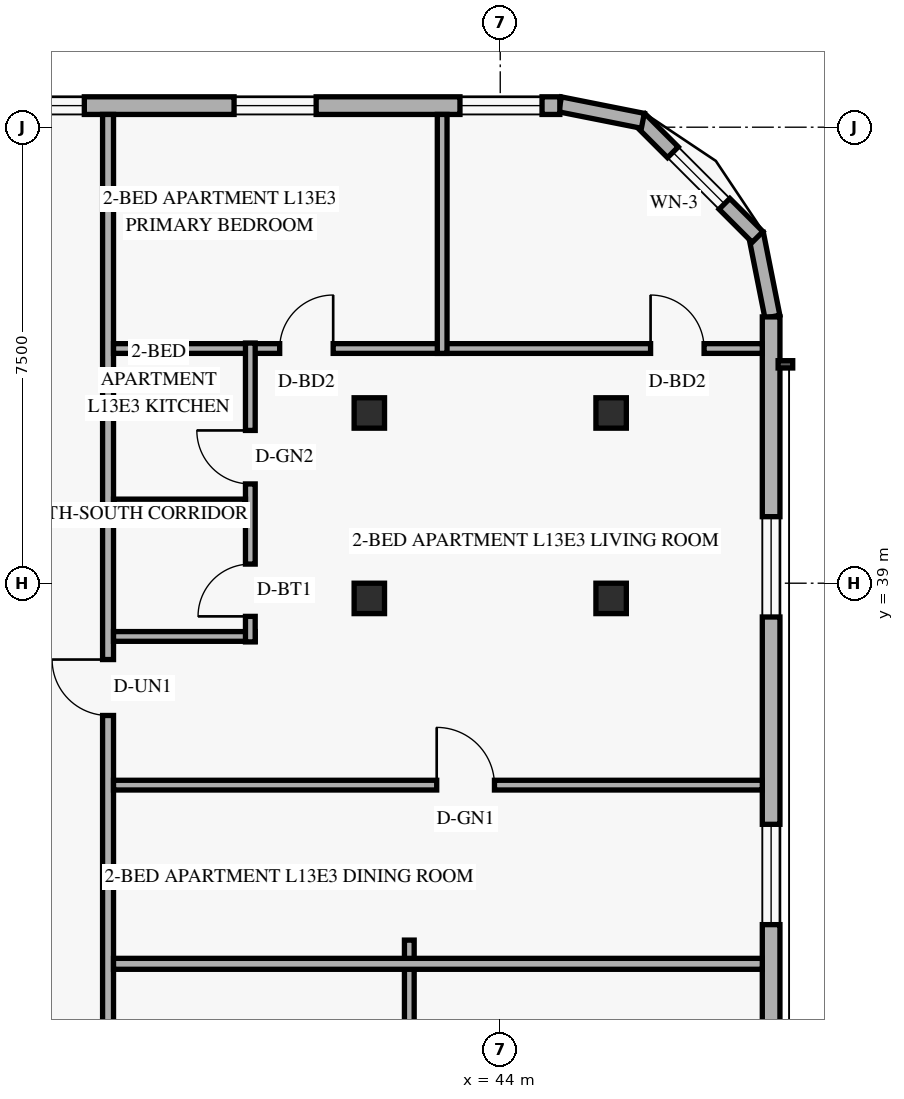
"""IFC4 building model, lengths in metres.
Left out: names, types, materials, properties, quantities, classifications, styles, units other than length and angle.
Written with IfcOpenShell. Run it as: python <this file> out.ifc"""

import sys

from ifc_helpers import new_model, si_unit, direction, frame, frame_2d, origin, origin_2d, place, context, subcontext, project, spatial, rectangle, hollow_rectangle, extrude, element, fill, save


model = new_model("IFC4")
c1 = context("Model", 3, precision=1e-05, world=origin(), true_north=direction((0.0, 1.0)))
c2 = subcontext(c1, "Body", "Model", "MODEL_VIEW")
j1 = project(units=[si_unit("LENGTHUNIT", "METRE"), si_unit("PLANEANGLEUNIT", "RADIAN")], contexts=[c1])
p1 = place(None, origin())
s1 = spatial("IfcSite", under=j1, at=p1, CompositionType="ELEMENT")
p2 = place(p1, origin())
s2 = spatial("IfcBuilding", under=s1, at=p2, CompositionType="ELEMENT")
p3 = place(p2, frame((0.0, 0.0, 52.8)))
s3 = spatial("IfcBuildingStorey", under=s2, at=p3, CompositionType="ELEMENT", Elevation=52.8)
for number, where, z_axis, x_axis in (
    (1, (41.784, 38.75, 0.0), (0.035, 0.0, 0.999), (0.0, 1.0, 0.0)),
    (2, (41.784, 41.8, 0.0), (0.035, 0.0, 0.999), (0.0, 1.0, 0.0)),
):
    element("IfcColumn", number, at=place(p3, frame(where, z_axis=z_axis, x_axis=x_axis)), inside=s3, PredefinedType="COLUMN", context=c2, shape_type="SweptSolid", body=[
        extrude(hollow_rectangle(XDim=0.5, YDim=0.5, WallThickness=0.022, at=origin_2d()), origin(), (0.0, 0.0, 1.0), 3.602),
    ])
for number, where, z_axis, x_axis in (
    (3, (45.719, 38.75, 0.0), (0.058, 0.0, 0.998), (0.0, 1.0, 0.0)),
    (4, (45.719, 41.8, 0.0), (0.058, 0.0, 0.998), (0.0, 1.0, 0.0)),
):
    element("IfcColumn", number, at=place(p3, frame(where, z_axis=z_axis, x_axis=x_axis)), inside=s3, PredefinedType="COLUMN", context=c2, shape_type="SweptSolid", body=[
        extrude(hollow_rectangle(XDim=0.5, YDim=0.5, WallThickness=0.022, at=origin_2d()), origin(), (0.0, 0.0, 1.0), 3.606),
    ])
p4 = place(p3, frame((48.476, 43.384, 0.0), z_axis=(0.0, 0.0, 1.0), x_axis=(-0.19496651342, 0.980809899341, 0.0)))
e5 = element("IfcWall", 5, at=p4, inside=s3, PredefinedType="SOLIDWALL", context=c2, shape_type="SweptSolid", body=[
    extrude(rectangle(XDim=1.389, YDim=0.25, at=frame_2d((0.694, 0.0))), origin(), (0.0, 0.0, 1.0), 3.36),
])
p5 = place(p3, frame((48.232, 44.695, 0.0), z_axis=(0.0, 0.0, 1.0), x_axis=(-0.707106781187, 0.707106781187, 0.0)))
e6 = element("IfcWall", 6, at=p5, inside=s3, PredefinedType="SOLIDWALL", context=c2, shape_type="SweptSolid", body=[
    extrude(rectangle(XDim=2.739, YDim=0.25, at=frame_2d((1.37, 0.0))), origin(), (0.0, 0.0, 1.0), 3.36),
])
p6 = place(p5, frame((0.77, 0.0, 0.85)))
e7 = element("IfcOpeningElement", 7, at=p6, cuts=e6, PredefinedType="OPENING", context=c2, shape_type="SweptSolid", body=[
    extrude(rectangle(XDim=1.2, YDim=1.5, at=frame_2d((0.6, 0.75))), frame((0.0, 0.135, 0.0), z_axis=(0.0, -1.0, 0.0), x_axis=(1.0, 0.0, 0.0)), (0.0, 0.0, 1.0), 0.27),
])
p7 = place(p3, frame((46.345, 46.605, 0.0), z_axis=(0.0, 0.0, 1.0), x_axis=(-0.980809899341, 0.19496651342, 0.0)))
e8 = element("IfcWall", 8, at=p7, inside=s3, PredefinedType="SOLIDWALL", context=c2, shape_type="SweptSolid", body=[
    extrude(rectangle(XDim=1.389, YDim=0.25, at=frame_2d((0.694, 0.0))), origin(), (0.0, 0.0, 1.0), 3.36),
])
p8 = place(p3, frame((48.455, 4.62, 0.0), z_axis=(0.0, 0.0, 1.0), x_axis=(0.0, 1.0, 0.0)))
e9 = element("IfcWall", 9, at=p8, inside=s3, PredefinedType="SOLIDWALL", context=c2, shape_type="SweptSolid", body=[
    extrude(rectangle(XDim=38.76, YDim=0.29, at=frame_2d((19.38, 0.0))), origin(), (0.0, 0.0, 1.0), 3.36),
])
p9 = place(p8, frame((5.415, 0.0, 0.85)))
e10 = element("IfcOpeningElement", 10, at=p9, cuts=e9, PredefinedType="OPENING", context=c2, shape_type="SweptSolid", body=[
    extrude(rectangle(XDim=1.65, YDim=1.6, at=frame_2d((0.825, 0.8))), frame((0.0, 0.155, 0.0), z_axis=(0.0, -1.0, 0.0), x_axis=(1.0, 0.0, 0.0)), (0.0, 0.0, 1.0), 0.31),
])
p10 = place(p8, frame((13.559, 0.0, 0.85)))
e11 = element("IfcOpeningElement", 11, at=p10, cuts=e9, PredefinedType="OPENING", context=c2, shape_type="SweptSolid", body=[
    extrude(rectangle(XDim=1.65, YDim=1.6, at=frame_2d((0.825, 0.8))), frame((0.0, 0.155, 0.0), z_axis=(0.0, -1.0, 0.0), x_axis=(1.0, 0.0, 0.0)), (0.0, 0.0, 1.0), 0.31),
])
p11 = place(p8, frame((19.134, 0.0, 0.85)))
e12 = element("IfcOpeningElement", 12, at=p11, cuts=e9, PredefinedType="OPENING", context=c2, shape_type="SweptSolid", body=[
    extrude(rectangle(XDim=1.65, YDim=1.6, at=frame_2d((0.825, 0.8))), frame((0.0, 0.155, 0.0), z_axis=(0.0, -1.0, 0.0), x_axis=(1.0, 0.0, 0.0)), (0.0, 0.0, 1.0), 0.31),
])
p12 = place(p8, frame((25.05, 0.0, 0.85)))
e13 = element("IfcOpeningElement", 13, at=p12, cuts=e9, PredefinedType="OPENING", context=c2, shape_type="SweptSolid", body=[
    extrude(rectangle(XDim=1.65, YDim=1.6, at=frame_2d((0.825, 0.8))), frame((0.0, 0.155, 0.0), z_axis=(0.0, -1.0, 0.0), x_axis=(1.0, 0.0, 0.0)), (0.0, 0.0, 1.0), 0.31),
])
p13 = place(p8, frame((28.764, 0.0, 0.85)))
e14 = element("IfcOpeningElement", 14, at=p13, cuts=e9, PredefinedType="OPENING", context=c2, shape_type="SweptSolid", body=[
    extrude(rectangle(XDim=1.65, YDim=1.6, at=frame_2d((0.825, 0.8))), frame((0.0, 0.155, 0.0), z_axis=(0.0, -1.0, 0.0), x_axis=(1.0, 0.0, 0.0)), (0.0, 0.0, 1.0), 0.31),
])
p14 = place(p8, frame((33.824, 0.0, 0.85)))
e15 = element("IfcOpeningElement", 15, at=p14, cuts=e9, PredefinedType="OPENING", context=c2, shape_type="SweptSolid", body=[
    extrude(rectangle(XDim=1.65, YDim=1.6, at=frame_2d((0.825, 0.8))), frame((0.0, 0.155, 0.0), z_axis=(0.0, -1.0, 0.0), x_axis=(1.0, 0.0, 0.0)), (0.0, 0.0, 1.0), 0.31),
])
p15 = place(p3, frame((44.98, 46.855, 0.0), z_axis=(0.0, 0.0, 1.0), x_axis=(-1.0, 0.0, 0.0)))
e16 = element("IfcWall", 16, at=p15, inside=s3, PredefinedType="SOLIDWALL", context=c2, shape_type="SweptSolid", body=[
    extrude(rectangle(XDim=39.56, YDim=0.29, at=frame_2d((19.78, 0.0))), origin(), (0.0, 0.0, 1.0), 3.36),
])
p16 = place(p15, frame((35.445, 0.0, 0.85)))
e17 = element("IfcOpeningElement", 17, at=p16, cuts=e16, PredefinedType="OPENING", context=c2, shape_type="SweptSolid", body=[
    extrude(rectangle(XDim=1.35, YDim=1.55, at=frame_2d((0.675, 0.775))), frame((0.0, 0.155, 0.0), z_axis=(0.0, -1.0, 0.0), x_axis=(1.0, 0.0, 0.0)), (0.0, 0.0, 1.0), 0.31),
])
p17 = place(p15, frame((31.18, 0.0, 0.85)))
e18 = element("IfcOpeningElement", 18, at=p17, cuts=e16, PredefinedType="OPENING", context=c2, shape_type="SweptSolid", body=[
    extrude(rectangle(XDim=1.2, YDim=1.5, at=frame_2d((0.6, 0.75))), frame((0.0, 0.155, 0.0), z_axis=(0.0, -1.0, 0.0), x_axis=(1.0, 0.0, 0.0)), (0.0, 0.0, 1.0), 0.31),
])
p18 = place(p15, frame((25.088, 0.0, 0.85)))
e19 = element("IfcOpeningElement", 19, at=p18, cuts=e16, PredefinedType="OPENING", context=c2, shape_type="SweptSolid", body=[
    extrude(rectangle(XDim=1.35, YDim=1.55, at=frame_2d((0.675, 0.775))), frame((0.0, 0.155, 0.0), z_axis=(0.0, -1.0, 0.0), x_axis=(1.0, 0.0, 0.0)), (0.0, 0.0, 1.0), 0.31),
])
p19 = place(p15, frame((16.498, 0.0, 0.85)))
e20 = element("IfcOpeningElement", 20, at=p19, cuts=e16, PredefinedType="OPENING", context=c2, shape_type="SweptSolid", body=[
    extrude(rectangle(XDim=1.35, YDim=1.55, at=frame_2d((0.675, 0.775))), frame((0.0, 0.155, 0.0), z_axis=(0.0, -1.0, 0.0), x_axis=(1.0, 0.0, 0.0)), (0.0, 0.0, 1.0), 0.31),
])
p20 = place(p15, frame((10.955, 0.0, 0.85)))
e21 = element("IfcOpeningElement", 21, at=p20, cuts=e16, PredefinedType="OPENING", context=c2, shape_type="SweptSolid", body=[
    extrude(rectangle(XDim=1.35, YDim=1.55, at=frame_2d((0.675, 0.775))), frame((0.0, 0.155, 0.0), z_axis=(0.0, -1.0, 0.0), x_axis=(1.0, 0.0, 0.0)), (0.0, 0.0, 1.0), 0.31),
])
p21 = place(p15, frame((7.82, 0.0, 0.85)))
e22 = element("IfcOpeningElement", 22, at=p21, cuts=e16, PredefinedType="OPENING", context=c2, shape_type="SweptSolid", body=[
    extrude(rectangle(XDim=1.35, YDim=1.55, at=frame_2d((0.675, 0.775))), frame((0.0, 0.155, 0.0), z_axis=(0.0, -1.0, 0.0), x_axis=(1.0, 0.0, 0.0)), (0.0, 0.0, 1.0), 0.31),
])
p22 = place(p15, frame((4.008, 0.0, 0.85)))
e23 = element("IfcOpeningElement", 23, at=p22, cuts=e16, PredefinedType="OPENING", context=c2, shape_type="SweptSolid", body=[
    extrude(rectangle(XDim=1.35, YDim=1.55, at=frame_2d((0.675, 0.775))), frame((0.0, 0.155, 0.0), z_axis=(0.0, -1.0, 0.0), x_axis=(1.0, 0.0, 0.0)), (0.0, 0.0, 1.0), 0.31),
])
p23 = place(p15, frame((0.292, 0.0, 0.85)))
e24 = element("IfcOpeningElement", 24, at=p23, cuts=e16, PredefinedType="OPENING", context=c2, shape_type="SweptSolid", body=[
    extrude(rectangle(XDim=1.35, YDim=1.55, at=frame_2d((0.675, 0.775))), frame((0.0, 0.155, 0.0), z_axis=(0.0, -1.0, 0.0), x_axis=(1.0, 0.0, 0.0)), (0.0, 0.0, 1.0), 0.31),
])
p24 = place(p3, frame((37.55, 1.29, 0.0), z_axis=(0.0, 0.0, 1.0), x_axis=(0.0, 1.0, 0.0)))
e25 = element("IfcWall", 25, at=p24, inside=s3, PredefinedType="STANDARD", context=c2, shape_type="SweptSolid", body=[
    extrude(rectangle(XDim=45.42, YDim=0.18, at=frame_2d((22.71, 0.0))), origin(), (0.0, 0.0, 1.0), 2.649),
])
p25 = place(p24, frame((9.87, 0.0, 0.0)))
e26 = element("IfcOpeningElement", 26, at=p25, cuts=e25, PredefinedType="OPENING", context=c2, shape_type="SweptSolid", body=[
    extrude(rectangle(XDim=0.92, YDim=2.15, at=frame_2d((0.46, 1.075))), frame((0.0, 0.1, 0.0), z_axis=(0.0, -1.0, 0.0), x_axis=(1.0, 0.0, 0.0)), (0.0, 0.0, 1.0), 0.2),
])
p26 = place(p24, frame((20.953, 0.0, 0.0)))
e27 = element("IfcOpeningElement", 27, at=p26, cuts=e25, PredefinedType="OPENING", context=c2, shape_type="SweptSolid", body=[
    extrude(rectangle(XDim=0.92, YDim=2.15, at=frame_2d((0.46, 1.075))), frame((0.0, 0.1, 0.0), z_axis=(0.0, -1.0, 0.0), x_axis=(1.0, 0.0, 0.0)), (0.0, 0.0, 1.0), 0.2),
])
p27 = place(p24, frame((35.534, 0.0, 0.0)))
e28 = element("IfcOpeningElement", 28, at=p27, cuts=e25, PredefinedType="OPENING", context=c2, shape_type="SweptSolid", body=[
    extrude(rectangle(XDim=0.92, YDim=2.15, at=frame_2d((0.46, 1.075))), frame((0.0, 0.1, 0.0), z_axis=(0.0, -1.0, 0.0), x_axis=(1.0, 0.0, 0.0)), (0.0, 0.0, 1.0), 0.2),
])
p28 = place(p3, frame((42.504, 28.17, 0.0), z_axis=(0.0, 0.0, 1.0), x_axis=(0.0, 1.0, 0.0)))
e29 = element("IfcWall", 29, at=p28, inside=s3, PredefinedType="PARTITIONING", context=c2, shape_type="SweptSolid", body=[
    extrude(rectangle(XDim=4.96, YDim=0.16, at=frame_2d((2.48, 0.0))), origin(), (0.0, 0.0, 1.0), 2.649),
])
p29 = place(p3, frame((37.64, 32.74, 0.0), z_axis=(0.0, 0.0, 1.0), x_axis=(1.0, 0.0, 0.0)))
e30 = element("IfcWall", 30, at=p29, inside=s3, PredefinedType="PARTITIONING", context=c2, shape_type="SweptSolid", body=[
    extrude(rectangle(XDim=10.67, YDim=0.18, at=frame_2d((5.335, 0.0))), origin(), (0.0, 0.0, 1.0), 2.649),
])
p30 = place(p3, frame((37.64, 42.86, 0.0), z_axis=(0.0, 0.0, 1.0), x_axis=(1.0, 0.0, 0.0)))
e31 = element("IfcWall", 31, at=p30, inside=s3, PredefinedType="PARTITIONING", context=c2, shape_type="SweptSolid", body=[
    extrude(rectangle(XDim=10.67, YDim=0.16, at=frame_2d((5.335, 0.0))), origin(), (0.0, 0.0, 1.0), 3.36),
])
p31 = place(p30, frame((2.732, 0.0, 0.0)))
e32 = element("IfcOpeningElement", 32, at=p31, cuts=e31, PredefinedType="OPENING", context=c2, shape_type="SweptSolid", body=[
    extrude(rectangle(XDim=0.88, YDim=2.14, at=frame_2d((0.44, 1.07))), frame((0.0, 0.09, 0.0), z_axis=(0.0, -1.0, 0.0), x_axis=(1.0, 0.0, 0.0)), (0.0, 0.0, 1.0), 0.18),
])
p32 = place(p30, frame((8.833, 0.0, 0.0)))
e33 = element("IfcOpeningElement", 33, at=p32, cuts=e31, PredefinedType="OPENING", context=c2, shape_type="SweptSolid", body=[
    extrude(rectangle(XDim=0.88, YDim=2.14, at=frame_2d((0.44, 1.07))), frame((0.0, 0.09, 0.0), z_axis=(0.0, -1.0, 0.0), x_axis=(1.0, 0.0, 0.0)), (0.0, 0.0, 1.0), 0.18),
])
p33 = place(p3, frame((37.64, 38.125, 0.0), z_axis=(0.0, 0.0, 1.0), x_axis=(1.0, 0.0, 0.0)))
e34 = element("IfcWall", 34, at=p33, inside=s3, PredefinedType="PLUMBINGWALL", context=c2, shape_type="SweptSolid", body=[
    extrude(rectangle(XDim=2.33, YDim=0.16, at=frame_2d((1.165, 0.0))), origin(), (0.0, 0.0, 1.0), 3.36),
])
p34 = place(p3, frame((39.89, 38.034, 0.0), z_axis=(0.0, 0.0, 1.0), x_axis=(0.0, 1.0, 0.0)))
e35 = element("IfcWall", 35, at=p34, inside=s3, PredefinedType="PLUMBINGWALL", context=c2, shape_type="SweptSolid", body=[
    extrude(rectangle(XDim=4.916, YDim=0.16, at=frame_2d((2.458, 0.0))), origin(), (0.0, 0.0, 1.0), 2.649),
])
p35 = place(p34, frame((0.42, 0.0, 0.0)))
e36 = element("IfcOpeningElement", 36, at=p35, cuts=e35, PredefinedType="OPENING", context=c2, shape_type="SweptSolid", body=[
    extrude(rectangle(XDim=0.86, YDim=2.12, at=frame_2d((0.43, 1.06))), frame((0.0, 0.09, 0.0), z_axis=(0.0, -1.0, 0.0), x_axis=(1.0, 0.0, 0.0)), (0.0, 0.0, 1.0), 0.18),
])
p36 = place(p34, frame((2.598, 0.0, 0.0)))
e37 = element("IfcOpeningElement", 37, at=p36, cuts=e35, PredefinedType="OPENING", context=c2, shape_type="SweptSolid", body=[
    extrude(rectangle(XDim=0.88, YDim=2.12, at=frame_2d((0.44, 1.06))), frame((0.0, 0.09, 0.0), z_axis=(0.0, -1.0, 0.0), x_axis=(1.0, 0.0, 0.0)), (0.0, 0.0, 1.0), 0.18),
])
p37 = place(p3, frame((37.64, 40.303, 0.0), z_axis=(0.0, 0.0, 1.0), x_axis=(1.0, 0.0, 0.0)))
e38 = element("IfcWall", 38, at=p37, inside=s3, PredefinedType="PLUMBINGWALL", context=c2, shape_type="SweptSolid", body=[
    extrude(rectangle(XDim=2.17, YDim=0.16, at=frame_2d((1.085, 0.0))), origin(), (0.0, 0.0, 1.0), 3.36),
])
p38 = place(p3, frame((37.64, 35.679, 0.0), z_axis=(0.0, 0.0, 1.0), x_axis=(1.0, 0.0, 0.0)))
e39 = element("IfcWall", 39, at=p38, inside=s3, PredefinedType="PARTITIONING", context=c2, shape_type="SweptSolid", body=[
    extrude(rectangle(XDim=10.67, YDim=0.16, at=frame_2d((5.335, 0.0))), origin(), (0.0, 0.0, 1.0), 2.649),
])
p39 = place(p38, frame((5.315, 0.0, 0.0)))
e40 = element("IfcOpeningElement", 40, at=p39, cuts=e39, PredefinedType="OPENING", context=c2, shape_type="SweptSolid", body=[
    extrude(rectangle(XDim=0.95, YDim=2.15, at=frame_2d((0.475, 1.075))), frame((0.0, 0.09, 0.0), z_axis=(0.0, -1.0, 0.0), x_axis=(1.0, 0.0, 0.0)), (0.0, 0.0, 1.0), 0.18),
])
p40 = place(p3, frame((43.045, 42.78, 0.0), z_axis=(0.0, 0.0, 1.0), x_axis=(0.0, 1.0, 0.0)))
e41 = element("IfcWall", 41, at=p40, inside=s3, PredefinedType="PARTITIONING", context=c2, shape_type="SweptSolid", body=[
    extrude(rectangle(XDim=3.93, YDim=0.16, at=frame_2d((1.965, 0.0))), origin(), (0.0, 0.0, 1.0), 3.36),
])
p41 = place(p6, origin())
e42 = element("IfcWindow", 42, at=p41, inside=s3, PartitioningType="SINGLE_PANEL", PredefinedType="WINDOW", context=c2, shape_type="SweptSolid", body=[
    extrude(rectangle(XDim=1.2, YDim=1.5, at=frame_2d((0.6, 0.75))), frame((0.0, 0.03, 0.0), z_axis=(0.0, -1.0, 0.0), x_axis=(1.0, 0.0, 0.0)), (0.0, 0.0, 1.0), 0.06),
])
fill(e7, e42)
p42 = place(p13, origin())
e43 = element("IfcWindow", 43, at=p42, inside=s3, PartitioningType="SINGLE_PANEL", PredefinedType="WINDOW", context=c2, shape_type="SweptSolid", body=[
    extrude(rectangle(XDim=1.65, YDim=1.6, at=frame_2d((0.825, 0.8))), frame((0.0, 0.03, 0.0), z_axis=(0.0, -1.0, 0.0), x_axis=(1.0, 0.0, 0.0)), (0.0, 0.0, 1.0), 0.06),
])
fill(e14, e43)
p43 = place(p14, origin())
e44 = element("IfcWindow", 44, at=p43, inside=s3, PartitioningType="SINGLE_PANEL", PredefinedType="WINDOW", context=c2, shape_type="SweptSolid", body=[
    extrude(rectangle(XDim=1.65, YDim=1.6, at=frame_2d((0.825, 0.8))), frame((0.0, 0.03, 0.0), z_axis=(0.0, -1.0, 0.0), x_axis=(1.0, 0.0, 0.0)), (0.0, 0.0, 1.0), 0.06),
])
fill(e15, e44)
p44 = place(p21, origin())
e45 = element("IfcWindow", 45, at=p44, inside=s3, PartitioningType="SINGLE_PANEL", PredefinedType="WINDOW", context=c2, shape_type="SweptSolid", body=[
    extrude(rectangle(XDim=1.35, YDim=1.55, at=frame_2d((0.675, 0.775))), frame((0.0, 0.03, 0.0), z_axis=(0.0, -1.0, 0.0), x_axis=(1.0, 0.0, 0.0)), (0.0, 0.0, 1.0), 0.06),
])
fill(e22, e45)
p45 = place(p22, origin())
e46 = element("IfcWindow", 46, at=p45, inside=s3, PartitioningType="SINGLE_PANEL", PredefinedType="WINDOW", context=c2, shape_type="SweptSolid", body=[
    extrude(rectangle(XDim=1.35, YDim=1.55, at=frame_2d((0.675, 0.775))), frame((0.0, 0.03, 0.0), z_axis=(0.0, -1.0, 0.0), x_axis=(1.0, 0.0, 0.0)), (0.0, 0.0, 1.0), 0.06),
])
fill(e23, e46)
p46 = place(p23, origin())
e47 = element("IfcWindow", 47, at=p46, inside=s3, PartitioningType="SINGLE_PANEL", PredefinedType="WINDOW", context=c2, shape_type="SweptSolid", body=[
    extrude(rectangle(XDim=1.35, YDim=1.55, at=frame_2d((0.675, 0.775))), frame((0.0, 0.03, 0.0), z_axis=(0.0, -1.0, 0.0), x_axis=(1.0, 0.0, 0.0)), (0.0, 0.0, 1.0), 0.06),
])
fill(e24, e47)
p47 = place(p39, origin())
e48 = element("IfcDoor", 48, at=p47, inside=s3, OperationType="SINGLE_SWING_LEFT", PredefinedType="DOOR", context=c2, shape_type="SweptSolid", body=[
    extrude(rectangle(XDim=0.95, YDim=2.15, at=frame_2d((0.475, 1.075))), frame((0.0, 0.025, 0.0), z_axis=(0.0, -1.0, 0.0), x_axis=(1.0, 0.0, 0.0)), (0.0, 0.0, 1.0), 0.05),
])
fill(e40, e48)
p48 = place(p27, origin())
e49 = element("IfcDoor", 49, at=p48, inside=s3, OperationType="SINGLE_SWING_RIGHT", PredefinedType="DOOR", context=c2, shape_type="SweptSolid", body=[
    extrude(rectangle(XDim=0.92, YDim=2.15, at=frame_2d((0.46, 1.075))), frame((0.0, 0.025, 0.0), z_axis=(0.0, -1.0, 0.0), x_axis=(1.0, 0.0, 0.0)), (0.0, 0.0, 1.0), 0.05),
])
fill(e28, e49)
p49 = place(p35, origin())
e50 = element("IfcDoor", 50, at=p49, inside=s3, OperationType="SINGLE_SWING_LEFT", PredefinedType="DOOR", context=c2, shape_type="SweptSolid", body=[
    extrude(rectangle(XDim=0.86, YDim=2.12, at=frame_2d((0.43, 1.06))), frame((0.0, 0.025, 0.0), z_axis=(0.0, -1.0, 0.0), x_axis=(1.0, 0.0, 0.0)), (0.0, 0.0, 1.0), 0.05),
])
fill(e36, e50)
p50 = place(p36, origin())
e51 = element("IfcDoor", 51, at=p50, inside=s3, OperationType="SINGLE_SWING_RIGHT", PredefinedType="DOOR", context=c2, shape_type="SweptSolid", body=[
    extrude(rectangle(XDim=0.88, YDim=2.12, at=frame_2d((0.44, 1.06))), frame((0.0, 0.025, 0.0), z_axis=(0.0, -1.0, 0.0), x_axis=(1.0, 0.0, 0.0)), (0.0, 0.0, 1.0), 0.05),
])
fill(e37, e51)
p51 = place(p31, origin())
e52 = element("IfcDoor", 52, at=p51, inside=s3, OperationType="SINGLE_SWING_RIGHT", PredefinedType="DOOR", context=c2, shape_type="SweptSolid", body=[
    extrude(rectangle(XDim=0.88, YDim=2.14, at=frame_2d((0.44, 1.07))), frame((0.0, 0.025, 0.0), z_axis=(0.0, -1.0, 0.0), x_axis=(1.0, 0.0, 0.0)), (0.0, 0.0, 1.0), 0.05),
])
fill(e32, e52)
p52 = place(p32, origin())
e53 = element("IfcDoor", 53, at=p52, inside=s3, OperationType="SINGLE_SWING_LEFT", PredefinedType="DOOR", context=c2, shape_type="SweptSolid", body=[
    extrude(rectangle(XDim=0.88, YDim=2.14, at=frame_2d((0.44, 1.07))), frame((0.0, 0.025, 0.0), z_axis=(0.0, -1.0, 0.0), x_axis=(1.0, 0.0, 0.0)), (0.0, 0.0, 1.0), 0.05),
])
fill(e33, e53)
save(model, sys.argv[1])
